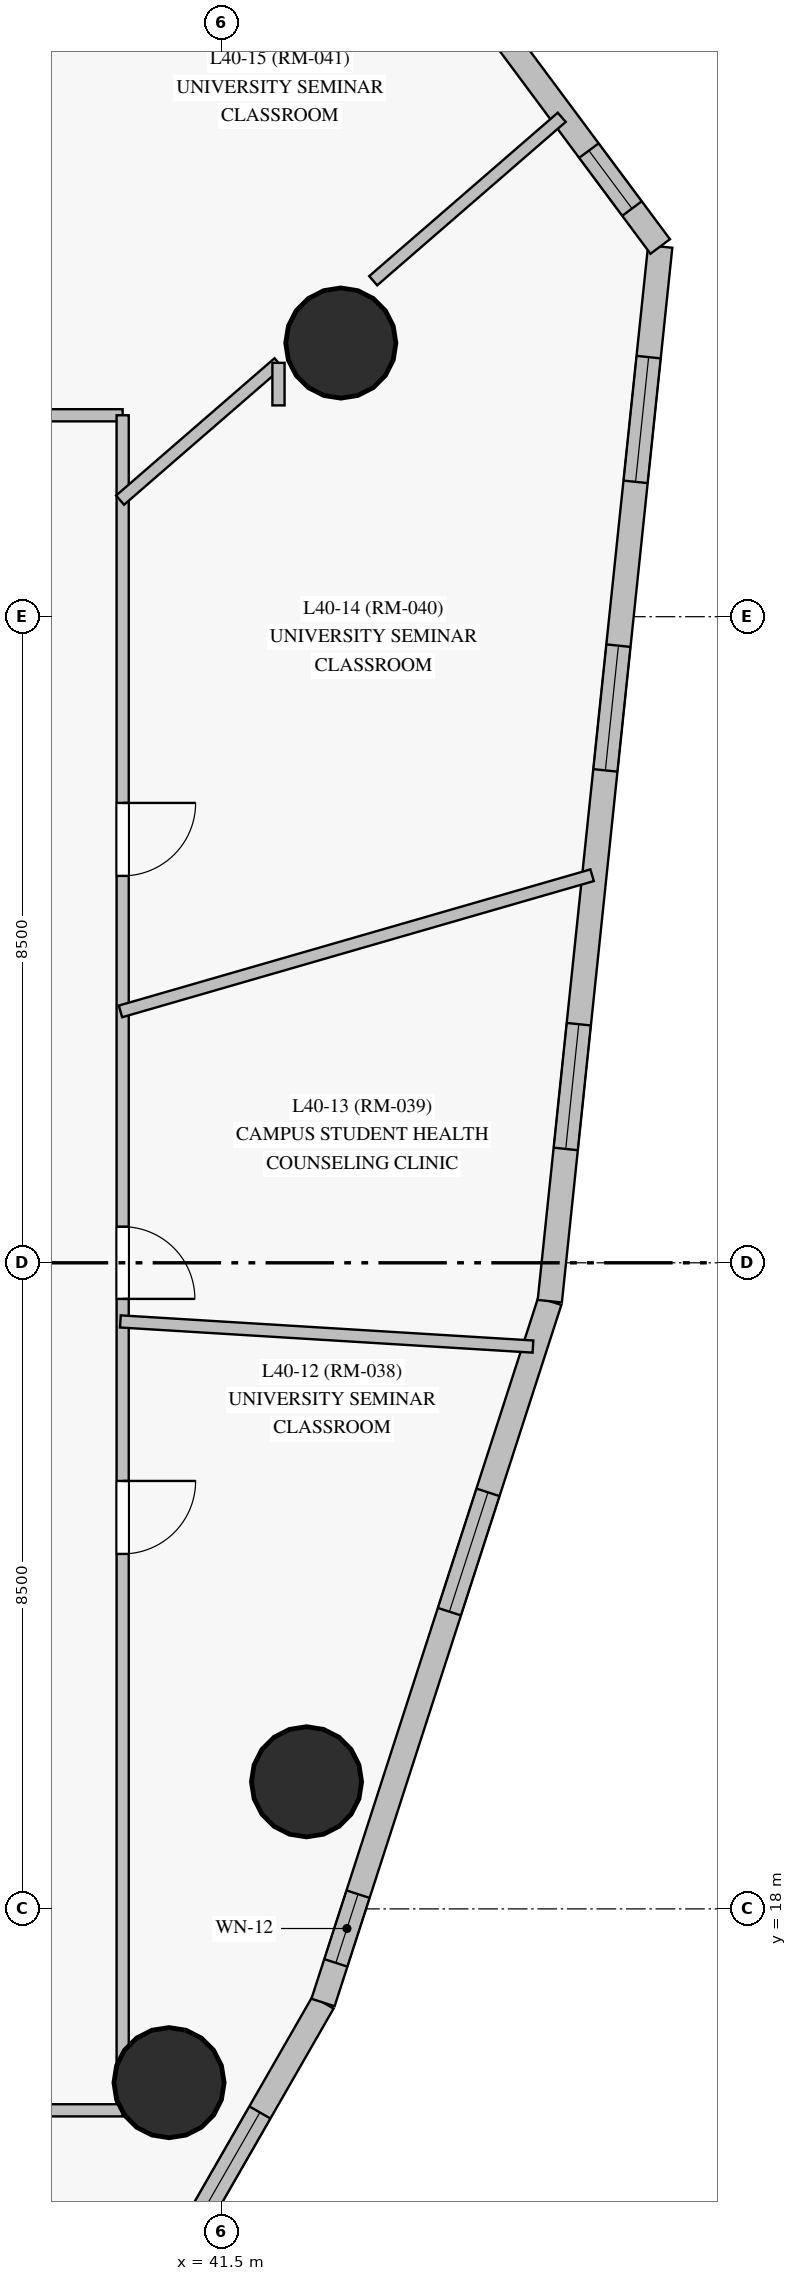
"""IFC4 building model, lengths in metres.
Left out: names, types, materials, properties, quantities, classifications, styles, units other than length and angle.
Written with IfcOpenShell. Run it as: python <this file> out.ifc"""

import sys

from ifc_helpers import new_model, si_unit, direction, frame, frame_2d, origin, origin_with_axes, origin_2d, place, context, subcontext, project, spatial, rectangle, circle, extrude, source, transform, mapped, element, fill, save


model = new_model("IFC4")
c1 = context("Model", 3, precision=1e-05, world=origin(), true_north=direction((0.0, 1.0)))
c2 = subcontext(c1, "Body", "Model", "MODEL_VIEW")
j1 = project(units=[si_unit("LENGTHUNIT", "METRE"), si_unit("PLANEANGLEUNIT", "RADIAN")], contexts=[c1])
p1 = place(None, origin())
s1 = spatial("IfcSite", under=j1, at=p1, CompositionType="ELEMENT")
p2 = place(p1, origin())
s2 = spatial("IfcBuilding", under=s1, at=p2, CompositionType="ELEMENT")
p3 = place(p2, frame((0.0, 0.0, 141.95)))
s3 = spatial("IfcBuildingStorey", under=s2, at=p3, CompositionType="ELEMENT", Elevation=141.95)
m1 = source(origin_with_axes(), c2, "Body", "SweptSolid", [
    extrude(circle(Radius=0.725, at=origin_2d()), origin(), (0.0, 0.0, 1.0), 3.05),
])
for number, where, z_axis, x_axis in (
    (1, (42.619, 19.672, 0.0), (0.0, 0.0, 1.0), (1.0, 0.0, 0.0)),
    (2, (43.07, 38.6, 0.0), (0.0, 0.0, 1.0), (1.0, 0.0, 0.0)),
    (3, (40.81, 15.714, 0.0), (0.0, 0.0, 1.0), (1.0, 0.0, 0.0)),
):
    element("IfcColumn", number, at=place(p3, frame(where, z_axis=z_axis, x_axis=x_axis)), inside=s3, PredefinedType="COLUMN", context=c2, shape_type="MappedRepresentation", body=[
        mapped(m1, transform((0.0, 0.0, 0.0), scale=1.0)),
    ])
p4 = place(p3, frame((35.889, 4.67, 0.0), z_axis=(0.0, 0.0, 1.0), x_axis=(0.497941368399, 0.867210697372, 0.0)))
e4 = element("IfcWall", 4, at=p4, inside=s3, PredefinedType="SOLIDWALL", context=c2, shape_type="SweptSolid", body=[
    extrude(rectangle(XDim=13.951, YDim=0.32, at=frame_2d((6.976, 0.0))), origin(), (0.0, 0.0, 1.0), 2.825),
])
p5 = place(p4, frame((2.181, 0.0, 0.85)))
e5 = element("IfcOpeningElement", 5, at=p5, cuts=e4, PredefinedType="OPENING", context=c2, shape_type="SweptSolid", body=[
    extrude(rectangle(XDim=1.65, YDim=1.65, at=frame_2d((0.825, 0.825))), frame((0.0, 0.17, 0.0), z_axis=(0.0, -1.0, 0.0), x_axis=(1.0, 0.0, 0.0)), (0.0, 0.0, 1.0), 0.34),
])
p6 = place(p4, frame((6.407, 0.0, 0.85)))
e6 = element("IfcOpeningElement", 6, at=p6, cuts=e4, PredefinedType="OPENING", context=c2, shape_type="SweptSolid", body=[
    extrude(rectangle(XDim=1.65, YDim=1.65, at=frame_2d((0.825, 0.825))), frame((0.0, 0.17, 0.0), z_axis=(0.0, -1.0, 0.0), x_axis=(1.0, 0.0, 0.0)), (0.0, 0.0, 1.0), 0.34),
])
p7 = place(p4, frame((10.633, 0.0, 0.85)))
e7 = element("IfcOpeningElement", 7, at=p7, cuts=e4, PredefinedType="OPENING", context=c2, shape_type="SweptSolid", body=[
    extrude(rectangle(XDim=1.65, YDim=1.65, at=frame_2d((0.825, 0.825))), frame((0.0, 0.17, 0.0), z_axis=(0.0, -1.0, 0.0), x_axis=(1.0, 0.0, 0.0)), (0.0, 0.0, 1.0), 0.34),
])
p8 = place(p3, frame((42.836, 16.769, 0.0), z_axis=(0.0, 0.0, 1.0), x_axis=(0.307672133186, 0.951492437417, 0.0)))
e8 = element("IfcWall", 8, at=p8, inside=s3, PredefinedType="SOLIDWALL", context=c2, shape_type="SweptSolid", body=[
    extrude(rectangle(XDim=9.697, YDim=0.32, at=frame_2d((4.848, 0.0))), origin(), (0.0, 0.0, 1.0), 2.825),
])
p9 = place(p8, frame((0.548, 0.0, 0.85)))
e9 = element("IfcOpeningElement", 9, at=p9, cuts=e8, PredefinedType="OPENING", context=c2, shape_type="SweptSolid", body=[
    extrude(rectangle(XDim=0.95, YDim=1.5, at=frame_2d((0.475, 0.75))), frame((0.0, 0.17, 0.0), z_axis=(0.0, -1.0, 0.0), x_axis=(1.0, 0.0, 0.0)), (0.0, 0.0, 1.0), 0.34),
])
p10 = place(p8, frame((5.404, 0.0, 0.85)))
e10 = element("IfcOpeningElement", 10, at=p10, cuts=e8, PredefinedType="OPENING", context=c2, shape_type="SweptSolid", body=[
    extrude(rectangle(XDim=1.65, YDim=1.65, at=frame_2d((0.825, 0.825))), frame((0.0, 0.17, 0.0), z_axis=(0.0, -1.0, 0.0), x_axis=(1.0, 0.0, 0.0)), (0.0, 0.0, 1.0), 0.34),
])
p11 = place(p3, frame((45.819, 25.995, 0.0), z_axis=(0.0, 0.0, 1.0), x_axis=(0.104139122077, 0.994562739727, 0.0)))
e11 = element("IfcWall", 11, at=p11, inside=s3, PredefinedType="SOLIDWALL", context=c2, shape_type="SweptSolid", body=[
    extrude(rectangle(XDim=13.951, YDim=0.32, at=frame_2d((6.976, 0.0))), origin(), (0.0, 0.0, 1.0), 2.825),
])
p12 = place(p11, frame((2.014, 0.0, 0.85)))
e12 = element("IfcOpeningElement", 12, at=p12, cuts=e11, PredefinedType="OPENING", context=c2, shape_type="SweptSolid", body=[
    extrude(rectangle(XDim=1.65, YDim=1.65, at=frame_2d((0.825, 0.825))), frame((0.0, 0.17, 0.0), z_axis=(0.0, -1.0, 0.0), x_axis=(1.0, 0.0, 0.0)), (0.0, 0.0, 1.0), 0.34),
])
p13 = place(p11, frame((7.021, 0.0, 0.85)))
e13 = element("IfcOpeningElement", 13, at=p13, cuts=e11, PredefinedType="OPENING", context=c2, shape_type="SweptSolid", body=[
    extrude(rectangle(XDim=1.65, YDim=1.65, at=frame_2d((0.825, 0.825))), frame((0.0, 0.17, 0.0), z_axis=(0.0, -1.0, 0.0), x_axis=(1.0, 0.0, 0.0)), (0.0, 0.0, 1.0), 0.34),
])
p14 = place(p11, frame((10.838, 0.0, 0.85)))
e14 = element("IfcOpeningElement", 14, at=p14, cuts=e11, PredefinedType="OPENING", context=c2, shape_type="SweptSolid", body=[
    extrude(rectangle(XDim=1.65, YDim=1.65, at=frame_2d((0.825, 0.825))), frame((0.0, 0.17, 0.0), z_axis=(0.0, -1.0, 0.0), x_axis=(1.0, 0.0, 0.0)), (0.0, 0.0, 1.0), 0.34),
])
p15 = place(p3, frame((47.272, 39.87, 0.0), z_axis=(0.0, 0.0, 1.0), x_axis=(-0.596716111469, 0.802452417476, 0.0)))
e15 = element("IfcWall", 15, at=p15, inside=s3, PredefinedType="SOLIDWALL", context=c2, shape_type="SweptSolid", body=[
    extrude(rectangle(XDim=9.364, YDim=0.32, at=frame_2d((4.682, 0.0))), origin(), (0.0, 0.0, 1.0), 2.825),
])
p16 = place(p15, frame((0.622, 0.0, 0.85)))
e16 = element("IfcOpeningElement", 16, at=p16, cuts=e15, PredefinedType="OPENING", context=c2, shape_type="SweptSolid", body=[
    extrude(rectangle(XDim=0.95, YDim=1.5, at=frame_2d((0.475, 0.75))), frame((0.0, 0.17, 0.0), z_axis=(0.0, -1.0, 0.0), x_axis=(1.0, 0.0, 0.0)), (0.0, 0.0, 1.0), 0.34),
])
p17 = place(p15, frame((4.872, 0.0, 0.85)))
e17 = element("IfcOpeningElement", 17, at=p17, cuts=e15, PredefinedType="OPENING", context=c2, shape_type="SweptSolid", body=[
    extrude(rectangle(XDim=1.65, YDim=1.65, at=frame_2d((0.825, 0.825))), frame((0.0, 0.17, 0.0), z_axis=(0.0, -1.0, 0.0), x_axis=(1.0, 0.0, 0.0)), (0.0, 0.0, 1.0), 0.34),
])
p18 = place(p3, frame((16.7, 37.65, 0.0), z_axis=(0.0, 0.0, 1.0), x_axis=(1.0, 0.0, 0.0)))
e18 = element("IfcWall", 18, at=p18, inside=s3, PredefinedType="PARTITIONING", context=c2, shape_type="SweptSolid", body=[
    extrude(rectangle(XDim=23.5, YDim=0.16, at=frame_2d((11.75, 0.0))), origin(), (0.0, 0.0, 1.0), 2.325),
])
p19 = place(p18, frame((20.8, 0.0, 0.0)))
e19 = element("IfcOpeningElement", 19, at=p19, cuts=e18, PredefinedType="OPENING", context=c2, shape_type="SweptSolid", body=[
    extrude(rectangle(XDim=0.96, YDim=2.15, at=frame_2d((0.48, 1.075))), frame((0.0, 0.09, 0.0), z_axis=(0.0, -1.0, 0.0), x_axis=(1.0, 0.0, 0.0)), (0.0, 0.0, 1.0), 0.18),
])
p20 = place(p18, frame((11.275, 0.0, 0.0)))
e20 = element("IfcOpeningElement", 20, at=p20, cuts=e18, PredefinedType="OPENING", context=c2, shape_type="SweptSolid", body=[
    extrude(rectangle(XDim=0.96, YDim=2.15, at=frame_2d((0.48, 1.075))), frame((0.0, 0.09, 0.0), z_axis=(0.0, -1.0, 0.0), x_axis=(1.0, 0.0, 0.0)), (0.0, 0.0, 1.0), 0.18),
])
p21 = place(p18, frame((7.75, 0.0, 0.0)))
e21 = element("IfcOpeningElement", 21, at=p21, cuts=e18, PredefinedType="OPENING", context=c2, shape_type="SweptSolid", body=[
    extrude(rectangle(XDim=0.96, YDim=2.15, at=frame_2d((0.48, 1.075))), frame((0.0, 0.09, 0.0), z_axis=(0.0, -1.0, 0.0), x_axis=(1.0, 0.0, 0.0)), (0.0, 0.0, 1.0), 0.18),
])
p22 = place(p3, frame((40.2, 37.65, 0.0), z_axis=(0.0, 0.0, 1.0), x_axis=(0.0, -1.0, 0.0)))
e22 = element("IfcWall", 22, at=p22, inside=s3, PredefinedType="PARTITIONING", context=c2, shape_type="SweptSolid", body=[
    extrude(rectangle(XDim=22.3, YDim=0.16, at=frame_2d((11.15, 0.0))), origin(), (0.0, 0.0, 1.0), 2.325),
])
p23 = place(p22, frame((14.02, 0.0, 0.0)))
e23 = element("IfcOpeningElement", 23, at=p23, cuts=e22, PredefinedType="OPENING", context=c2, shape_type="SweptSolid", body=[
    extrude(rectangle(XDim=0.96, YDim=2.15, at=frame_2d((0.48, 1.075))), frame((0.0, 0.09, 0.0), z_axis=(0.0, -1.0, 0.0), x_axis=(1.0, 0.0, 0.0)), (0.0, 0.0, 1.0), 0.18),
])
p24 = place(p22, frame((10.675, 0.0, 0.0)))
e24 = element("IfcOpeningElement", 24, at=p24, cuts=e22, PredefinedType="OPENING", context=c2, shape_type="SweptSolid", body=[
    extrude(rectangle(XDim=0.95, YDim=2.15, at=frame_2d((0.475, 1.075))), frame((0.0, 0.09, 0.0), z_axis=(0.0, -1.0, 0.0), x_axis=(1.0, 0.0, 0.0)), (0.0, 0.0, 1.0), 0.18),
])
p25 = place(p22, frame((5.1, 0.0, 0.0)))
e25 = element("IfcOpeningElement", 25, at=p25, cuts=e22, PredefinedType="OPENING", context=c2, shape_type="SweptSolid", body=[
    extrude(rectangle(XDim=0.96, YDim=2.15, at=frame_2d((0.48, 1.075))), frame((0.0, 0.09, 0.0), z_axis=(0.0, -1.0, 0.0), x_axis=(1.0, 0.0, 0.0)), (0.0, 0.0, 1.0), 0.18),
])
p26 = place(p3, frame((35.596, 37.612, 0.0), z_axis=(0.0, 0.0, 1.0), x_axis=(0.53436425584, 0.845254306159, 0.0)))
e26 = element("IfcWall", 26, at=p26, inside=s3, PredefinedType="PARTITIONING", context=c2, shape_type="SweptSolid", body=[
    extrude(rectangle(XDim=11.454, YDim=0.16, at=frame_2d((5.727, 0.0))), origin(), (0.0, 0.0, 1.0), 2.825),
])
p27 = place(p26, frame((5.227, 0.0, 0.0)))
e27 = element("IfcOpeningElement", 27, at=p27, cuts=e26, PredefinedType="OPENING", context=c2, shape_type="SweptSolid", body=[
    extrude(rectangle(XDim=0.95, YDim=2.15, at=frame_2d((0.475, 1.075))), frame((0.0, 0.09, 0.0), z_axis=(0.0, -1.0, 0.0), x_axis=(1.0, 0.0, 0.0)), (0.0, 0.0, 1.0), 0.18),
])
p28 = place(p3, frame((40.2, 15.35, 0.0), z_axis=(0.0, 0.0, 1.0), x_axis=(-1.0, 0.0, 0.0)))
e28 = element("IfcWall", 28, at=p28, inside=s3, PredefinedType="PARTITIONING", context=c2, shape_type="SweptSolid", body=[
    extrude(rectangle(XDim=10.65, YDim=0.16, at=frame_2d((5.325, 0.0))), origin(), (0.0, 0.0, 1.0), 2.225),
])
p29 = place(p28, frame((4.85, 0.0, 0.0)))
e29 = element("IfcOpeningElement", 29, at=p29, cuts=e28, PredefinedType="OPENING", context=c2, shape_type="SweptSolid", body=[
    extrude(rectangle(XDim=0.95, YDim=2.15, at=frame_2d((0.475, 1.075))), frame((0.0, 0.09, 0.0), z_axis=(0.0, -1.0, 0.0), x_axis=(1.0, 0.0, 0.0)), (0.0, 0.0, 1.0), 0.18),
])
p30 = place(p3, frame((40.171, 29.807, 0.0), z_axis=(0.0, 0.0, 1.0), x_axis=(0.960768592646, 0.277351241904, 0.0)))
e30 = element("IfcWall", 30, at=p30, inside=s3, PredefinedType="PARTITIONING", context=c2, shape_type="SweptSolid", body=[
    extrude(rectangle(XDim=6.458, YDim=0.16, at=frame_2d((3.229, 0.0))), origin(), (0.0, 0.0, 1.0), 2.825),
])
p31 = place(p3, frame((40.17, 25.729, 0.0), z_axis=(0.0, 0.0, 1.0), x_axis=(0.998147818111, -0.060835295679, 0.0)))
e31 = element("IfcWall", 31, at=p31, inside=s3, PredefinedType="PARTITIONING", context=c2, shape_type="SweptSolid", body=[
    extrude(rectangle(XDim=5.438, YDim=0.16, at=frame_2d((2.719, 0.0))), origin(), (0.0, 0.0, 1.0), 2.825),
])
p32 = place(p3, frame((43.496, 39.42, 0.0), z_axis=(0.0, 0.0, 1.0), x_axis=(0.755622829895, 0.655006976254, 0.0)))
e32 = element("IfcWall", 32, at=p32, inside=s3, PredefinedType="PARTITIONING", context=c2, shape_type="SweptSolid", body=[
    extrude(rectangle(XDim=3.283, YDim=0.16, at=frame_2d((1.642, 0.0))), origin(), (0.0, 0.0, 1.0), 2.825),
])
p33 = place(p3, frame((40.166, 36.533, 0.0), z_axis=(0.0, 0.0, 1.0), x_axis=(0.755595613728, 0.655038371788, 0.0)))
e33 = element("IfcWall", 33, at=p33, inside=s3, PredefinedType="PARTITIONING", context=c2, shape_type="SweptSolid", body=[
    extrude(rectangle(XDim=2.758, YDim=0.16, at=frame_2d((1.379, 0.0))), origin(), (0.0, 0.0, 1.0), 2.225),
])
p34 = place(p3, frame((42.25, 38.34, 0.0), z_axis=(0.0, 0.0, 1.0), x_axis=(0.0, -1.0, 0.0)))
e34 = element("IfcWall", 34, at=p34, inside=s3, PredefinedType="PARTITIONING", context=c2, shape_type="SweptSolid", body=[
    extrude(rectangle(XDim=0.56, YDim=0.16, at=frame_2d((0.28, 0.0))), origin(), (0.0, 0.0, 1.0), 2.325),
])
m2 = source(origin_with_axes(), c2, "Body", "SweptSolid", [
    extrude(rectangle(XDim=1.65, YDim=1.65, at=frame_2d((0.825, 0.825))), frame((0.0, 0.03, 0.0), z_axis=(0.0, -1.0, 0.0), x_axis=(1.0, 0.0, 0.0)), (0.0, 0.0, 1.0), 0.06),
])
p35 = place(p7, origin())
e35 = element("IfcWindow", 35, at=p35, inside=s3, PartitioningType="SINGLE_PANEL", PredefinedType="WINDOW", context=c2, shape_type="MappedRepresentation", body=[
    mapped(m2, transform((0.0, 0.0, 0.0), scale=1.0)),
])
fill(e7, e35)
m3 = source(origin_with_axes(), c2, "Body", "SweptSolid", [
    extrude(rectangle(XDim=0.95, YDim=1.5, at=frame_2d((0.475, 0.75))), frame((0.0, 0.03, 0.0), z_axis=(0.0, -1.0, 0.0), x_axis=(1.0, 0.0, 0.0)), (0.0, 0.0, 1.0), 0.06),
])
p36 = place(p9, origin())
e36 = element("IfcWindow", 36, at=p36, inside=s3, PartitioningType="SINGLE_PANEL", PredefinedType="WINDOW", context=c2, shape_type="MappedRepresentation", body=[
    mapped(m3, transform((0.0, 0.0, 0.0), scale=1.0)),
])
fill(e9, e36)
p37 = place(p10, origin())
e37 = element("IfcWindow", 37, at=p37, inside=s3, PartitioningType="SINGLE_PANEL", PredefinedType="WINDOW", context=c2, shape_type="MappedRepresentation", body=[
    mapped(m2, transform((0.0, 0.0, 0.0), scale=1.0)),
])
fill(e10, e37)
p38 = place(p12, origin())
e38 = element("IfcWindow", 38, at=p38, inside=s3, PartitioningType="SINGLE_PANEL", PredefinedType="WINDOW", context=c2, shape_type="MappedRepresentation", body=[
    mapped(m2, transform((0.0, 0.0, 0.0), scale=1.0)),
])
fill(e12, e38)
p39 = place(p13, origin())
e39 = element("IfcWindow", 39, at=p39, inside=s3, PartitioningType="SINGLE_PANEL", PredefinedType="WINDOW", context=c2, shape_type="MappedRepresentation", body=[
    mapped(m2, transform((0.0, 0.0, 0.0), scale=1.0)),
])
fill(e13, e39)
p40 = place(p14, origin())
e40 = element("IfcWindow", 40, at=p40, inside=s3, PartitioningType="SINGLE_PANEL", PredefinedType="WINDOW", context=c2, shape_type="MappedRepresentation", body=[
    mapped(m2, transform((0.0, 0.0, 0.0), scale=1.0)),
])
fill(e14, e40)
p41 = place(p16, origin())
e41 = element("IfcWindow", 41, at=p41, inside=s3, PartitioningType="SINGLE_PANEL", PredefinedType="WINDOW", context=c2, shape_type="MappedRepresentation", body=[
    mapped(m3, transform((0.0, 0.0, 0.0), scale=1.0)),
])
fill(e16, e41)
m4 = source(origin_with_axes(), c2, "Body", "SweptSolid", [
    extrude(rectangle(XDim=0.96, YDim=2.15, at=frame_2d((0.48, 1.075))), frame((0.0, 0.025, 0.0), z_axis=(0.0, -1.0, 0.0), x_axis=(1.0, 0.0, 0.0)), (0.0, 0.0, 1.0), 0.05),
])
p42 = place(p23, origin())
e42 = element("IfcDoor", 42, at=p42, inside=s3, OperationType="SINGLE_SWING_LEFT", PredefinedType="DOOR", context=c2, shape_type="MappedRepresentation", body=[
    mapped(m4, transform((0.0, 0.0, 0.0), scale=1.0)),
])
fill(e23, e42)
m5 = source(origin_with_axes(), c2, "Body", "SweptSolid", [
    extrude(rectangle(XDim=0.95, YDim=2.15, at=frame_2d((0.475, 1.075))), frame((0.0, 0.025, 0.0), z_axis=(0.0, -1.0, 0.0), x_axis=(1.0, 0.0, 0.0)), (0.0, 0.0, 1.0), 0.05),
])
p43 = place(p24, origin())
e43 = element("IfcDoor", 43, at=p43, inside=s3, OperationType="SINGLE_SWING_RIGHT", PredefinedType="DOOR", context=c2, shape_type="MappedRepresentation", body=[
    mapped(m5, transform((0.0, 0.0, 0.0), scale=1.0)),
])
fill(e24, e43)
p44 = place(p25, origin())
e44 = element("IfcDoor", 44, at=p44, inside=s3, OperationType="SINGLE_SWING_LEFT", PredefinedType="DOOR", context=c2, shape_type="MappedRepresentation", body=[
    mapped(m4, transform((0.0, 0.0, 0.0), scale=1.0)),
])
fill(e25, e44)
save(model, sys.argv[1])
